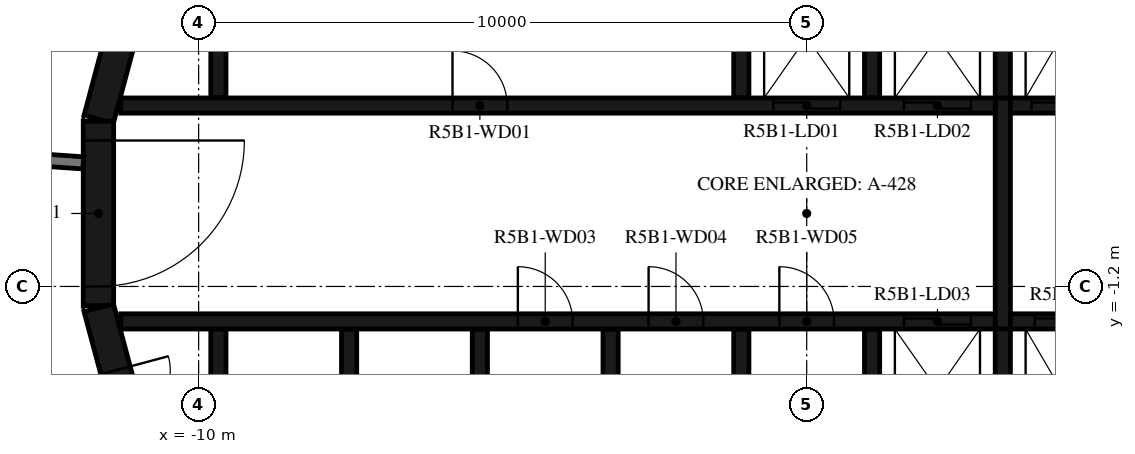
"""IFC4 building model, lengths in metres.
Left out: names, types, materials, properties, quantities, classifications, styles, units other than length and angle.
Written with IfcOpenShell. Run it as: python <this file> out.ifc"""

import sys

from ifc_helpers import new_model, si_unit, direction, frame, frame_2d, origin, place, context, subcontext, project, spatial, polyline, rectangle, outline, extrude, element, fill, save


model = new_model("IFC4")
c1 = context("Model", 3, precision=1e-05, world=origin(), true_north=direction((0.0, 1.0)))
c2 = subcontext(c1, "Body", "Model", "MODEL_VIEW")
j1 = project(units=[si_unit("LENGTHUNIT", "METRE"), si_unit("PLANEANGLEUNIT", "RADIAN")], contexts=[c1])
p1 = place(None, origin())
s1 = spatial("IfcSite", under=j1, at=p1, CompositionType="ELEMENT")
p2 = place(p1, origin())
s2 = spatial("IfcBuilding", under=s1, at=p2, CompositionType="ELEMENT")
p3 = place(p2, frame((0.0, 0.0, 198.9)))
s3 = spatial("IfcBuildingStorey", under=s2, at=p3, CompositionType="ELEMENT", Elevation=198.9)
p4 = place(p3, frame((-10.858, 4.479, 0.0), z_axis=(0.0, 0.0, 1.0), x_axis=(-0.258734743916, -0.965948410781, 0.0)))
e1 = element("IfcWall", 1, at=p4, inside=s3, PredefinedType="SHEAR", context=c2, shape_type="SweptSolid", body=[
    extrude(rectangle(XDim=3.033, YDim=0.5, at=frame_2d((1.516, 0.0))), origin(), (0.0, 0.0, 1.0), 3.12),
])
p5 = place(p3, frame((-11.647, 1.516, 0.0), z_axis=(0.0, 0.0, 1.0), x_axis=(0.0, -1.0, 0.0)))
e2 = element("IfcWall", 2, at=p5, inside=s3, PredefinedType="SHEAR", context=c2, shape_type="SweptSolid", body=[
    extrude(rectangle(XDim=3.033, YDim=0.5, at=frame_2d((1.516, 0.0))), origin(), (0.0, 0.0, 1.0), 3.12),
])
p6 = place(p5, frame((0.316, 0.0, 0.0)))
e3 = element("IfcOpeningElement", 3, at=p6, cuts=e2, PredefinedType="OPENING", context=c2, shape_type="SweptSolid", body=[
    extrude(rectangle(XDim=2.4, YDim=2.1, at=frame_2d((1.2, 1.05))), frame((0.0, 0.26, 0.0), z_axis=(0.0, -1.0, 0.0), x_axis=(1.0, 0.0, 0.0)), (0.0, 0.0, 1.0), 0.52),
])
p7 = place(p3, frame((-11.643, -1.55, 0.0), z_axis=(0.0, 0.0, 1.0), x_axis=(0.258734743916, -0.965948410781, 0.0)))
e4 = element("IfcWall", 4, at=p7, inside=s3, PredefinedType="SHEAR", context=c2, shape_type="SweptSolid", body=[
    extrude(rectangle(XDim=3.033, YDim=0.5, at=frame_2d((1.516, 0.0))), origin(), (0.0, 0.0, 1.0), 3.12),
])
p8 = place(p7, frame((1.066, 0.0, 0.0)))
e5 = element("IfcOpeningElement", 5, at=p8, cuts=e4, PredefinedType="OPENING", context=c2, shape_type="SweptSolid", body=[
    extrude(rectangle(XDim=0.9, YDim=2.1, at=frame_2d((0.45, 1.05))), frame((0.0, 0.26, 0.0), z_axis=(0.0, -1.0, 0.0), x_axis=(1.0, 0.0, 0.0)), (0.0, 0.0, 1.0), 0.52),
])
p9 = place(p3, origin())
e6 = element("IfcWall", 6, at=p9, inside=s3, PredefinedType="SHEAR", context=c2, shape_type="SweptSolid", body=[
    extrude(outline(polyline([(-9.55, 4.8), (-1.2, 4.8), (-1.2, 1.9), (-0.95, 1.9), (-0.95, 4.8), (0.95, 4.8), (0.95, 1.9), (1.2, 1.9), (1.2, 4.8), (3.1, 4.8), (3.1, 1.9), (3.35, 1.9), (3.35, 4.8), (5.25, 4.8), (5.25, 1.9), (5.5, 1.9), (5.5, 4.8), (7.4, 4.8), (7.4, 1.9), (7.65, 1.9), (7.65, 4.8), (9.55, 4.8), (9.55, 1.9), (9.8, 1.9), (9.8, 4.8), (9.8, 5.05), (-9.8, 5.05), (-9.8, 4.8), (-9.8, 1.9), (-9.55, 1.9), (-9.55, 4.8)])), origin(), (0.0, 0.0, 1.0), 3.12),
])
p10 = place(p3, origin())
e7 = element("IfcWall", 7, at=p10, inside=s3, PredefinedType="SHEAR", context=c2, shape_type="SweptSolid", body=[
    extrude(outline(polyline([(9.8, -5.05), (9.8, -4.8), (9.8, -1.9), (9.55, -1.9), (9.55, -4.8), (7.65, -4.8), (7.65, -1.9), (7.4, -1.9), (7.4, -4.8), (5.5, -4.8), (5.5, -1.9), (5.25, -1.9), (5.25, -4.8), (3.35, -4.8), (3.35, -1.9), (3.1, -1.9), (3.1, -4.8), (1.2, -4.8), (1.2, -1.9), (0.95, -1.9), (0.95, -4.8), (-0.95, -4.8), (-0.95, -1.9), (-1.2, -1.9), (-1.2, -4.8), (-3.1, -4.8), (-3.1, -1.9), (-3.35, -1.9), (-3.35, -4.8), (-5.25, -4.8), (-5.25, -1.9), (-5.5, -1.9), (-5.5, -4.8), (-7.4, -4.8), (-7.4, -1.9), (-7.65, -1.9), (-7.65, -4.8), (-9.55, -4.8), (-9.55, -1.9), (-9.8, -1.9), (-9.8, -4.8), (-9.8, -5.05), (9.8, -5.05)])), origin(), (0.0, 0.0, 1.0), 3.12),
])
p11 = place(p3, frame((-11.28, 1.775, 0.0), z_axis=(0.0, 0.0, 1.0), x_axis=(1.0, 0.0, 0.0)))
e8 = element("IfcWall", 8, at=p11, inside=s3, PredefinedType="SHEAR", context=c2, shape_type="SweptSolid", body=[
    extrude(rectangle(XDim=14.38, YDim=0.25, at=frame_2d((7.19, 0.0))), origin(), (0.0, 0.0, 1.0), 3.12),
])
p12 = place(p11, frame((10.73, 0.0, 0.0)))
e9 = element("IfcOpeningElement", 9, at=p12, cuts=e8, PredefinedType="OPENING", context=c2, shape_type="SweptSolid", body=[
    extrude(rectangle(XDim=1.1, YDim=2.1, at=frame_2d((0.55, 1.05))), frame((0.0, 0.135, 0.0), z_axis=(0.0, -1.0, 0.0), x_axis=(1.0, 0.0, 0.0)), (0.0, 0.0, 1.0), 0.27),
])
p13 = place(p11, frame((12.88, 0.0, 0.0)))
e10 = element("IfcOpeningElement", 10, at=p13, cuts=e8, PredefinedType="OPENING", context=c2, shape_type="SweptSolid", body=[
    extrude(rectangle(XDim=1.1, YDim=2.1, at=frame_2d((0.55, 1.05))), frame((0.0, 0.135, 0.0), z_axis=(0.0, -1.0, 0.0), x_axis=(1.0, 0.0, 0.0)), (0.0, 0.0, 1.0), 0.27),
])
p14 = place(p11, frame((5.455, 0.0, 0.0)))
e11 = element("IfcOpeningElement", 11, at=p14, cuts=e8, PredefinedType="OPENING", context=c2, shape_type="SweptSolid", body=[
    extrude(rectangle(XDim=0.9, YDim=2.1, at=frame_2d((0.45, 1.05))), frame((0.0, 0.135, 0.0), z_axis=(0.0, -1.0, 0.0), x_axis=(1.0, 0.0, 0.0)), (0.0, 0.0, 1.0), 0.27),
])
p15 = place(p3, frame((3.35, 1.775, 0.0), z_axis=(0.0, 0.0, 1.0), x_axis=(1.0, 0.0, 0.0)))
e12 = element("IfcWall", 12, at=p15, inside=s3, PredefinedType="SHEAR", context=c2, shape_type="SweptSolid", body=[
    extrude(rectangle(XDim=7.93, YDim=0.25, at=frame_2d((3.965, 0.0))), origin(), (0.0, 0.0, 1.0), 3.12),
])
p16 = place(p15, frame((0.35, 0.0, 0.0)))
e13 = element("IfcOpeningElement", 13, at=p16, cuts=e12, PredefinedType="OPENING", context=c2, shape_type="SweptSolid", body=[
    extrude(rectangle(XDim=1.2, YDim=2.4, at=frame_2d((0.6, 1.2))), frame((0.0, 0.135, 0.0), z_axis=(0.0, -1.0, 0.0), x_axis=(1.0, 0.0, 0.0)), (0.0, 0.0, 1.0), 0.27),
])
p17 = place(p15, frame((2.5, 0.0, 0.0)))
e14 = element("IfcOpeningElement", 14, at=p17, cuts=e12, PredefinedType="OPENING", context=c2, shape_type="SweptSolid", body=[
    extrude(rectangle(XDim=1.2, YDim=2.4, at=frame_2d((0.6, 1.2))), frame((0.0, 0.135, 0.0), z_axis=(0.0, -1.0, 0.0), x_axis=(1.0, 0.0, 0.0)), (0.0, 0.0, 1.0), 0.27),
])
p18 = place(p15, frame((4.8, 0.0, 0.0)))
e15 = element("IfcOpeningElement", 15, at=p18, cuts=e12, PredefinedType="OPENING", context=c2, shape_type="SweptSolid", body=[
    extrude(rectangle(XDim=0.9, YDim=2.1, at=frame_2d((0.45, 1.05))), frame((0.0, 0.135, 0.0), z_axis=(0.0, -1.0, 0.0), x_axis=(1.0, 0.0, 0.0)), (0.0, 0.0, 1.0), 0.27),
])
p19 = place(p3, frame((-11.28, -1.775, 0.0), z_axis=(0.0, 0.0, 1.0), x_axis=(1.0, 0.0, 0.0)))
e16 = element("IfcWall", 16, at=p19, inside=s3, PredefinedType="SHEAR", context=c2, shape_type="SweptSolid", body=[
    extrude(rectangle(XDim=14.38, YDim=0.25, at=frame_2d((7.19, 0.0))), origin(), (0.0, 0.0, 1.0), 3.12),
])
p20 = place(p19, frame((12.88, 0.0, 0.0)))
e17 = element("IfcOpeningElement", 17, at=p20, cuts=e16, PredefinedType="OPENING", context=c2, shape_type="SweptSolid", body=[
    extrude(rectangle(XDim=1.1, YDim=2.1, at=frame_2d((0.55, 1.05))), frame((0.0, 0.135, 0.0), z_axis=(0.0, -1.0, 0.0), x_axis=(1.0, 0.0, 0.0)), (0.0, 0.0, 1.0), 0.27),
])
p21 = place(p19, frame((6.53, 0.0, 0.0)))
e18 = element("IfcOpeningElement", 18, at=p21, cuts=e16, PredefinedType="OPENING", context=c2, shape_type="SweptSolid", body=[
    extrude(rectangle(XDim=0.9, YDim=2.1, at=frame_2d((0.45, 1.05))), frame((0.0, 0.135, 0.0), z_axis=(0.0, -1.0, 0.0), x_axis=(1.0, 0.0, 0.0)), (0.0, 0.0, 1.0), 0.27),
])
p22 = place(p19, frame((8.68, 0.0, 0.0)))
e19 = element("IfcOpeningElement", 19, at=p22, cuts=e16, PredefinedType="OPENING", context=c2, shape_type="SweptSolid", body=[
    extrude(rectangle(XDim=0.9, YDim=2.1, at=frame_2d((0.45, 1.05))), frame((0.0, 0.135, 0.0), z_axis=(0.0, -1.0, 0.0), x_axis=(1.0, 0.0, 0.0)), (0.0, 0.0, 1.0), 0.27),
])
p23 = place(p19, frame((10.83, 0.0, 0.0)))
e20 = element("IfcOpeningElement", 20, at=p23, cuts=e16, PredefinedType="OPENING", context=c2, shape_type="SweptSolid", body=[
    extrude(rectangle(XDim=0.9, YDim=2.1, at=frame_2d((0.45, 1.05))), frame((0.0, 0.135, 0.0), z_axis=(0.0, -1.0, 0.0), x_axis=(1.0, 0.0, 0.0)), (0.0, 0.0, 1.0), 0.27),
])
p24 = place(p3, frame((3.35, -1.775, 0.0), z_axis=(0.0, 0.0, 1.0), x_axis=(1.0, 0.0, 0.0)))
e21 = element("IfcWall", 21, at=p24, inside=s3, PredefinedType="SHEAR", context=c2, shape_type="SweptSolid", body=[
    extrude(rectangle(XDim=7.93, YDim=0.25, at=frame_2d((3.965, 0.0))), origin(), (0.0, 0.0, 1.0), 3.12),
])
p25 = place(p24, frame((0.4, 0.0, 0.0)))
e22 = element("IfcOpeningElement", 22, at=p25, cuts=e21, PredefinedType="OPENING", context=c2, shape_type="SweptSolid", body=[
    extrude(rectangle(XDim=1.1, YDim=2.4, at=frame_2d((0.55, 1.2))), frame((0.0, 0.135, 0.0), z_axis=(0.0, -1.0, 0.0), x_axis=(1.0, 0.0, 0.0)), (0.0, 0.0, 1.0), 0.27),
])
p26 = place(p24, frame((2.55, 0.0, 0.0)))
e23 = element("IfcOpeningElement", 23, at=p26, cuts=e21, PredefinedType="OPENING", context=c2, shape_type="SweptSolid", body=[
    extrude(rectangle(XDim=1.1, YDim=2.4, at=frame_2d((0.55, 1.2))), frame((0.0, 0.135, 0.0), z_axis=(0.0, -1.0, 0.0), x_axis=(1.0, 0.0, 0.0)), (0.0, 0.0, 1.0), 0.27),
])
p27 = place(p24, frame((4.7, 0.0, 0.0)))
e24 = element("IfcOpeningElement", 24, at=p27, cuts=e21, PredefinedType="OPENING", context=c2, shape_type="SweptSolid", body=[
    extrude(rectangle(XDim=1.1, YDim=2.4, at=frame_2d((0.55, 1.2))), frame((0.0, 0.135, 0.0), z_axis=(0.0, -1.0, 0.0), x_axis=(1.0, 0.0, 0.0)), (0.0, 0.0, 1.0), 0.27),
])
p28 = place(p3, frame((3.225, -1.9, 0.0), z_axis=(0.0, 0.0, 1.0), x_axis=(0.0, 1.0, 0.0)))
e25 = element("IfcWall", 25, at=p28, inside=s3, PredefinedType="SHEAR", context=c2, shape_type="SweptSolid", body=[
    extrude(rectangle(XDim=3.8, YDim=0.25, at=frame_2d((1.9, 0.0))), origin(), (0.0, 0.0, 1.0), 3.12),
])
p29 = place(p3, frame((-13.367, 0.935, 0.0), z_axis=(0.0, 0.0, 1.0), x_axis=(0.997553656289, -0.069904955655, 0.0)))
e26 = element("IfcWall", 26, at=p29, inside=s3, PredefinedType="STANDARD", context=c2, shape_type="SweptSolid", body=[
    extrude(rectangle(XDim=1.474, YDim=0.2, at=frame_2d((0.737, 0.0))), origin(), (0.0, 0.0, 1.0), 3.12),
])
p30 = place(p6, origin())
e27 = element("IfcDoor", 27, at=p30, inside=s3, OperationType="DOUBLE_DOOR_SINGLE_SWING", PredefinedType="DOOR", context=c2, shape_type="SweptSolid", body=[
    extrude(rectangle(XDim=2.4, YDim=2.1, at=frame_2d((1.2, 1.05))), frame((0.0, 0.025, 0.0), z_axis=(0.0, -1.0, 0.0), x_axis=(1.0, 0.0, 0.0)), (0.0, 0.0, 1.0), 0.05),
])
fill(e3, e27)
p31 = place(p12, origin())
e28 = element("IfcDoor", 28, at=p31, inside=s3, OperationType="DOUBLE_DOOR_SLIDING", PredefinedType="DOOR", context=c2, shape_type="SweptSolid", body=[
    extrude(rectangle(XDim=1.1, YDim=2.1, at=frame_2d((0.55, 1.05))), frame((0.0, 0.025, 0.0), z_axis=(0.0, -1.0, 0.0), x_axis=(1.0, 0.0, 0.0)), (0.0, 0.0, 1.0), 0.05),
])
fill(e9, e28)
p32 = place(p13, origin())
e29 = element("IfcDoor", 29, at=p32, inside=s3, OperationType="DOUBLE_DOOR_SLIDING", PredefinedType="DOOR", context=c2, shape_type="SweptSolid", body=[
    extrude(rectangle(XDim=1.1, YDim=2.1, at=frame_2d((0.55, 1.05))), frame((0.0, 0.025, 0.0), z_axis=(0.0, -1.0, 0.0), x_axis=(1.0, 0.0, 0.0)), (0.0, 0.0, 1.0), 0.05),
])
fill(e10, e29)
p33 = place(p16, origin())
e30 = element("IfcDoor", 30, at=p33, inside=s3, OperationType="DOUBLE_DOOR_SLIDING", PredefinedType="DOOR", context=c2, shape_type="SweptSolid", body=[
    extrude(rectangle(XDim=1.2, YDim=2.4, at=frame_2d((0.6, 1.2))), frame((0.0, 0.025, 0.0), z_axis=(0.0, -1.0, 0.0), x_axis=(1.0, 0.0, 0.0)), (0.0, 0.0, 1.0), 0.05),
])
fill(e13, e30)
p34 = place(p20, origin())
e31 = element("IfcDoor", 31, at=p34, inside=s3, OperationType="DOUBLE_DOOR_SLIDING", PredefinedType="DOOR", context=c2, shape_type="SweptSolid", body=[
    extrude(rectangle(XDim=1.1, YDim=2.1, at=frame_2d((0.55, 1.05))), frame((0.0, 0.025, 0.0), z_axis=(0.0, -1.0, 0.0), x_axis=(1.0, 0.0, 0.0)), (0.0, 0.0, 1.0), 0.05),
])
fill(e17, e31)
p35 = place(p25, origin())
e32 = element("IfcDoor", 32, at=p35, inside=s3, OperationType="DOUBLE_DOOR_SLIDING", PredefinedType="DOOR", context=c2, shape_type="SweptSolid", body=[
    extrude(rectangle(XDim=1.1, YDim=2.4, at=frame_2d((0.55, 1.2))), frame((0.0, 0.025, 0.0), z_axis=(0.0, -1.0, 0.0), x_axis=(1.0, 0.0, 0.0)), (0.0, 0.0, 1.0), 0.05),
])
fill(e22, e32)
p36 = place(p14, origin())
e33 = element("IfcDoor", 33, at=p36, inside=s3, OperationType="SINGLE_SWING_LEFT", PredefinedType="DOOR", context=c2, shape_type="SweptSolid", body=[
    extrude(rectangle(XDim=0.9, YDim=2.1, at=frame_2d((0.45, 1.05))), frame((0.0, 0.025, 0.0), z_axis=(0.0, -1.0, 0.0), x_axis=(1.0, 0.0, 0.0)), (0.0, 0.0, 1.0), 0.05),
])
fill(e11, e33)
p37 = place(p21, origin())
e34 = element("IfcDoor", 34, at=p37, inside=s3, OperationType="SINGLE_SWING_LEFT", PredefinedType="DOOR", context=c2, shape_type="SweptSolid", body=[
    extrude(rectangle(XDim=0.9, YDim=2.1, at=frame_2d((0.45, 1.05))), frame((0.0, 0.025, 0.0), z_axis=(0.0, -1.0, 0.0), x_axis=(1.0, 0.0, 0.0)), (0.0, 0.0, 1.0), 0.05),
])
fill(e18, e34)
p38 = place(p22, origin())
e35 = element("IfcDoor", 35, at=p38, inside=s3, OperationType="SINGLE_SWING_RIGHT", PredefinedType="DOOR", context=c2, shape_type="SweptSolid", body=[
    extrude(rectangle(XDim=0.9, YDim=2.1, at=frame_2d((0.45, 1.05))), frame((0.0, 0.025, 0.0), z_axis=(0.0, -1.0, 0.0), x_axis=(1.0, 0.0, 0.0)), (0.0, 0.0, 1.0), 0.05),
])
fill(e19, e35)
p39 = place(p23, origin())
e36 = element("IfcDoor", 36, at=p39, inside=s3, OperationType="SINGLE_SWING_LEFT", PredefinedType="DOOR", context=c2, shape_type="SweptSolid", body=[
    extrude(rectangle(XDim=0.9, YDim=2.1, at=frame_2d((0.45, 1.05))), frame((0.0, 0.025, 0.0), z_axis=(0.0, -1.0, 0.0), x_axis=(1.0, 0.0, 0.0)), (0.0, 0.0, 1.0), 0.05),
])
fill(e20, e36)
p40 = place(p8, origin())
e37 = element("IfcDoor", 37, at=p40, inside=s3, OperationType="SINGLE_SWING_RIGHT", PredefinedType="DOOR", context=c2, shape_type="SweptSolid", body=[
    extrude(rectangle(XDim=0.9, YDim=2.1, at=frame_2d((0.45, 1.05))), frame((0.0, 0.025, 0.0), z_axis=(0.0, -1.0, 0.0), x_axis=(1.0, 0.0, 0.0)), (0.0, 0.0, 1.0), 0.05),
])
fill(e5, e37)
save(model, sys.argv[1])
